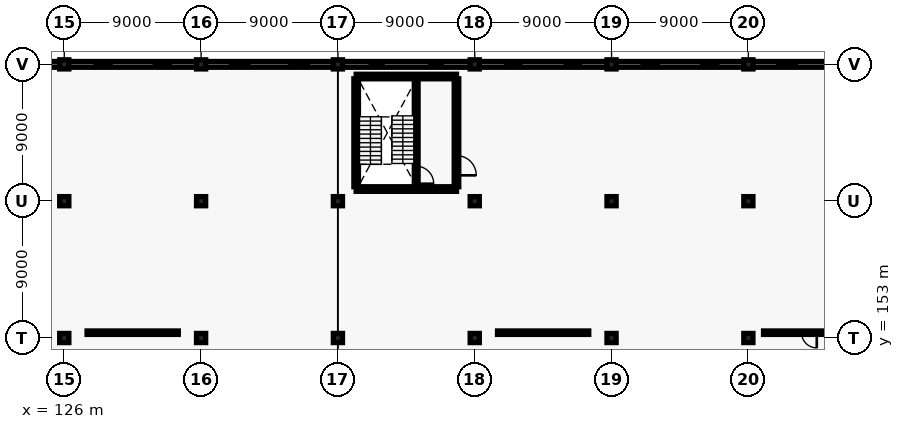
"""IFC4 building model, lengths in metres.
Left out: names, types, materials, properties, quantities, classifications, styles, units other than length and angle.
Written with IfcOpenShell. Run it as: python <this file> out.ifc"""

import sys

from ifc_helpers import new_model, si_unit, direction, frame, frame_2d, origin, origin_2d, place, context, subcontext, project, spatial, rectangle, extrude, element, fill, save


model = new_model("IFC4")
c1 = context("Model", 3, precision=1e-05, world=origin(), true_north=direction((0.0, 1.0)))
c2 = subcontext(c1, "Body", "Model", "MODEL_VIEW")
j1 = project(units=[si_unit("LENGTHUNIT", "METRE"), si_unit("PLANEANGLEUNIT", "RADIAN")], contexts=[c1])
p1 = place(None, origin())
s1 = spatial("IfcSite", under=j1, at=p1, CompositionType="ELEMENT")
p2 = place(p1, origin())
s2 = spatial("IfcBuilding", under=s1, at=p2, CompositionType="ELEMENT")
p3 = place(p2, frame((0.0, 0.0, 5.4)))
s3 = spatial("IfcBuildingStorey", under=s2, at=p3, CompositionType="ELEMENT", Elevation=5.4)
for number, where, z_axis, x_axis in (
    (1, (126.0, 153.0, 0.0), (0.0, 0.0, 1.0), (1.0, 0.0, 0.0)),
    (2, (126.0, 162.0, 0.0), (0.0, 0.0, 1.0), (1.0, 0.0, 0.0)),
    (3, (126.0, 171.0, 0.0), (0.0, 0.0, 1.0), (1.0, 0.0, 0.0)),
    (4, (135.0, 153.0, 0.0), (0.0, 0.0, 1.0), (1.0, 0.0, 0.0)),
    (5, (135.0, 162.0, 0.0), (0.0, 0.0, 1.0), (1.0, 0.0, 0.0)),
    (6, (135.0, 171.0, 0.0), (0.0, 0.0, 1.0), (1.0, 0.0, 0.0)),
    (7, (144.0, 153.0, 0.0), (0.0, 0.0, 1.0), (1.0, 0.0, 0.0)),
    (8, (144.0, 162.0, 0.0), (0.0, 0.0, 1.0), (1.0, 0.0, 0.0)),
    (9, (144.0, 171.0, 0.0), (0.0, 0.0, 1.0), (1.0, 0.0, 0.0)),
    (10, (153.0, 153.0, 0.0), (0.0, 0.0, 1.0), (1.0, 0.0, 0.0)),
    (11, (153.0, 162.0, 0.0), (0.0, 0.0, 1.0), (1.0, 0.0, 0.0)),
    (12, (153.0, 171.0, 0.0), (0.0, 0.0, 1.0), (1.0, 0.0, 0.0)),
    (13, (162.0, 153.0, 0.0), (0.0, 0.0, 1.0), (1.0, 0.0, 0.0)),
    (14, (162.0, 162.0, 0.0), (0.0, 0.0, 1.0), (1.0, 0.0, 0.0)),
    (15, (162.0, 171.0, 0.0), (0.0, 0.0, 1.0), (1.0, 0.0, 0.0)),
    (16, (171.0, 153.0, 0.0), (0.0, 0.0, 1.0), (1.0, 0.0, 0.0)),
    (17, (171.0, 162.0, 0.0), (0.0, 0.0, 1.0), (1.0, 0.0, 0.0)),
    (18, (171.0, 171.0, 0.0), (0.0, 0.0, 1.0), (1.0, 0.0, 0.0)),
):
    element("IfcColumn", number, at=place(p3, frame(where, z_axis=z_axis, x_axis=x_axis)), inside=s3, PredefinedType="COLUMN", context=c2, shape_type="SweptSolid", body=[
        extrude(rectangle(XDim=0.6, YDim=0.6, at=origin_2d()), origin(), (0.0, 0.0, 1.0), 4.2),
    ])
p4 = place(p3, frame((117.06, 171.0, 0.0), z_axis=(0.0, 0.0, 1.0), x_axis=(1.0, 0.0, 0.0)))
e19 = element("IfcWall", 19, at=p4, inside=s3, PredefinedType="SOLIDWALL", context=c2, shape_type="SweptSolid", body=[
    extrude(rectangle(XDim=8.88, YDim=0.38, at=frame_2d((4.44, 0.0))), origin(), (0.0, 0.0, 1.0), 3.4),
])
p5 = place(p4, frame((1.961, 0.0, 0.9)))
e20 = element("IfcOpeningElement", 20, at=p5, cuts=e19, PredefinedType="OPENING", context=c2, shape_type="SweptSolid", body=[
    extrude(rectangle(XDim=1.05, YDim=1.35, at=frame_2d((0.525, 0.675))), frame((0.0, 0.2, 0.0), z_axis=(0.0, -1.0, 0.0), x_axis=(1.0, 0.0, 0.0)), (0.0, 0.0, 1.0), 0.4),
])
p6 = place(p4, frame((5.869, 0.0, 0.9)))
e21 = element("IfcOpeningElement", 21, at=p6, cuts=e19, PredefinedType="OPENING", context=c2, shape_type="SweptSolid", body=[
    extrude(rectangle(XDim=1.05, YDim=1.35, at=frame_2d((0.525, 0.675))), frame((0.0, 0.2, 0.0), z_axis=(0.0, -1.0, 0.0), x_axis=(1.0, 0.0, 0.0)), (0.0, 0.0, 1.0), 0.4),
])
p7 = place(p3, frame((126.06, 171.0, 0.0), z_axis=(0.0, 0.0, 1.0), x_axis=(1.0, 0.0, 0.0)))
e22 = element("IfcWall", 22, at=p7, inside=s3, PredefinedType="SOLIDWALL", context=c2, shape_type="SweptSolid", body=[
    extrude(rectangle(XDim=8.88, YDim=0.38, at=frame_2d((4.44, 0.0))), origin(), (0.0, 0.0, 1.0), 3.4),
])
p8 = place(p7, frame((1.926, 0.0, 0.9)))
e23 = element("IfcOpeningElement", 23, at=p8, cuts=e22, PredefinedType="OPENING", context=c2, shape_type="SweptSolid", body=[
    extrude(rectangle(XDim=1.12, YDim=1.55, at=frame_2d((0.56, 0.775))), frame((0.0, 0.2, 0.0), z_axis=(0.0, -1.0, 0.0), x_axis=(1.0, 0.0, 0.0)), (0.0, 0.0, 1.0), 0.4),
])
p9 = place(p7, frame((5.834, 0.0, 0.9)))
e24 = element("IfcOpeningElement", 24, at=p9, cuts=e22, PredefinedType="OPENING", context=c2, shape_type="SweptSolid", body=[
    extrude(rectangle(XDim=1.12, YDim=1.55, at=frame_2d((0.56, 0.775))), frame((0.0, 0.2, 0.0), z_axis=(0.0, -1.0, 0.0), x_axis=(1.0, 0.0, 0.0)), (0.0, 0.0, 1.0), 0.4),
])
p10 = place(p3, frame((135.06, 171.0, 0.0), z_axis=(0.0, 0.0, 1.0), x_axis=(1.0, 0.0, 0.0)))
e25 = element("IfcWall", 25, at=p10, inside=s3, PredefinedType="SOLIDWALL", context=c2, shape_type="SweptSolid", body=[
    extrude(rectangle(XDim=8.88, YDim=0.38, at=frame_2d((4.44, 0.0))), origin(), (0.0, 0.0, 1.0), 3.4),
])
p11 = place(p10, frame((1.846, 0.0, 0.9)))
e26 = element("IfcOpeningElement", 26, at=p11, cuts=e25, PredefinedType="OPENING", context=c2, shape_type="SweptSolid", body=[
    extrude(rectangle(XDim=1.28, YDim=1.65, at=frame_2d((0.64, 0.825))), frame((0.0, 0.2, 0.0), z_axis=(0.0, -1.0, 0.0), x_axis=(1.0, 0.0, 0.0)), (0.0, 0.0, 1.0), 0.4),
])
p12 = place(p10, frame((5.754, 0.0, 0.9)))
e27 = element("IfcOpeningElement", 27, at=p12, cuts=e25, PredefinedType="OPENING", context=c2, shape_type="SweptSolid", body=[
    extrude(rectangle(XDim=1.28, YDim=1.65, at=frame_2d((0.64, 0.825))), frame((0.0, 0.2, 0.0), z_axis=(0.0, -1.0, 0.0), x_axis=(1.0, 0.0, 0.0)), (0.0, 0.0, 1.0), 0.4),
])
p13 = place(p3, frame((144.06, 171.0, 0.0), z_axis=(0.0, 0.0, 1.0), x_axis=(1.0, 0.0, 0.0)))
e28 = element("IfcWall", 28, at=p13, inside=s3, PredefinedType="SOLIDWALL", context=c2, shape_type="SweptSolid", body=[
    extrude(rectangle(XDim=8.88, YDim=0.38, at=frame_2d((4.44, 0.0))), origin(), (0.0, 0.0, 1.0), 3.4),
])
p14 = place(p13, frame((2.036, 0.0, 0.9)))
e29 = element("IfcOpeningElement", 29, at=p14, cuts=e28, PredefinedType="OPENING", context=c2, shape_type="SweptSolid", body=[
    extrude(rectangle(XDim=0.9, YDim=1.2, at=frame_2d((0.45, 0.6))), frame((0.0, 0.2, 0.0), z_axis=(0.0, -1.0, 0.0), x_axis=(1.0, 0.0, 0.0)), (0.0, 0.0, 1.0), 0.4),
])
p15 = place(p13, frame((5.944, 0.0, 0.9)))
e30 = element("IfcOpeningElement", 30, at=p15, cuts=e28, PredefinedType="OPENING", context=c2, shape_type="SweptSolid", body=[
    extrude(rectangle(XDim=0.9, YDim=1.2, at=frame_2d((0.45, 0.6))), frame((0.0, 0.2, 0.0), z_axis=(0.0, -1.0, 0.0), x_axis=(1.0, 0.0, 0.0)), (0.0, 0.0, 1.0), 0.4),
])
p16 = place(p3, frame((153.06, 171.0, 0.0), z_axis=(0.0, 0.0, 1.0), x_axis=(1.0, 0.0, 0.0)))
e31 = element("IfcWall", 31, at=p16, inside=s3, PredefinedType="SOLIDWALL", context=c2, shape_type="SweptSolid", body=[
    extrude(rectangle(XDim=8.88, YDim=0.38, at=frame_2d((4.44, 0.0))), origin(), (0.0, 0.0, 1.0), 3.4),
])
p17 = place(p16, frame((1.961, 0.0, 0.9)))
e32 = element("IfcOpeningElement", 32, at=p17, cuts=e31, PredefinedType="OPENING", context=c2, shape_type="SweptSolid", body=[
    extrude(rectangle(XDim=1.05, YDim=1.35, at=frame_2d((0.525, 0.675))), frame((0.0, 0.2, 0.0), z_axis=(0.0, -1.0, 0.0), x_axis=(1.0, 0.0, 0.0)), (0.0, 0.0, 1.0), 0.4),
])
p18 = place(p16, frame((5.869, 0.0, 0.9)))
e33 = element("IfcOpeningElement", 33, at=p18, cuts=e31, PredefinedType="OPENING", context=c2, shape_type="SweptSolid", body=[
    extrude(rectangle(XDim=1.05, YDim=1.35, at=frame_2d((0.525, 0.675))), frame((0.0, 0.2, 0.0), z_axis=(0.0, -1.0, 0.0), x_axis=(1.0, 0.0, 0.0)), (0.0, 0.0, 1.0), 0.4),
])
p19 = place(p3, frame((162.06, 171.0, 0.0), z_axis=(0.0, 0.0, 1.0), x_axis=(1.0, 0.0, 0.0)))
e34 = element("IfcWall", 34, at=p19, inside=s3, PredefinedType="SOLIDWALL", context=c2, shape_type="SweptSolid", body=[
    extrude(rectangle(XDim=8.88, YDim=0.38, at=frame_2d((4.44, 0.0))), origin(), (0.0, 0.0, 1.0), 3.4),
])
p20 = place(p19, frame((1.926, 0.0, 0.9)))
e35 = element("IfcOpeningElement", 35, at=p20, cuts=e34, PredefinedType="OPENING", context=c2, shape_type="SweptSolid", body=[
    extrude(rectangle(XDim=1.12, YDim=1.55, at=frame_2d((0.56, 0.775))), frame((0.0, 0.2, 0.0), z_axis=(0.0, -1.0, 0.0), x_axis=(1.0, 0.0, 0.0)), (0.0, 0.0, 1.0), 0.4),
])
p21 = place(p19, frame((5.834, 0.0, 0.9)))
e36 = element("IfcOpeningElement", 36, at=p21, cuts=e34, PredefinedType="OPENING", context=c2, shape_type="SweptSolid", body=[
    extrude(rectangle(XDim=1.12, YDim=1.55, at=frame_2d((0.56, 0.775))), frame((0.0, 0.2, 0.0), z_axis=(0.0, -1.0, 0.0), x_axis=(1.0, 0.0, 0.0)), (0.0, 0.0, 1.0), 0.4),
])
p22 = place(p3, frame((171.06, 171.0, 0.0), z_axis=(0.0, 0.0, 1.0), x_axis=(1.0, 0.0, 0.0)))
e37 = element("IfcWall", 37, at=p22, inside=s3, PredefinedType="SOLIDWALL", context=c2, shape_type="SweptSolid", body=[
    extrude(rectangle(XDim=8.88, YDim=0.38, at=frame_2d((4.44, 0.0))), origin(), (0.0, 0.0, 1.0), 3.4),
])
p23 = place(p22, frame((1.846, 0.0, 0.9)))
e38 = element("IfcOpeningElement", 38, at=p23, cuts=e37, PredefinedType="OPENING", context=c2, shape_type="SweptSolid", body=[
    extrude(rectangle(XDim=1.28, YDim=1.65, at=frame_2d((0.64, 0.825))), frame((0.0, 0.2, 0.0), z_axis=(0.0, -1.0, 0.0), x_axis=(1.0, 0.0, 0.0)), (0.0, 0.0, 1.0), 0.4),
])
p24 = place(p22, frame((5.754, 0.0, 0.9)))
e39 = element("IfcOpeningElement", 39, at=p24, cuts=e37, PredefinedType="OPENING", context=c2, shape_type="SweptSolid", body=[
    extrude(rectangle(XDim=1.28, YDim=1.65, at=frame_2d((0.64, 0.825))), frame((0.0, 0.2, 0.0), z_axis=(0.0, -1.0, 0.0), x_axis=(1.0, 0.0, 0.0)), (0.0, 0.0, 1.0), 0.4),
])
for number, where, z_axis, x_axis in (
    (40, (145.2, 162.8, 0.0), (0.0, 0.0, 1.0), (1.0, 0.0, 0.0)),
    (41, (145.2, 170.2, 0.0), (0.0, 0.0, 1.0), (1.0, 0.0, 0.0)),
):
    element("IfcWall", number, at=place(p3, frame(where, z_axis=z_axis, x_axis=x_axis)), inside=s3, PredefinedType="SHEAR", context=c2, shape_type="SweptSolid", body=[
        extrude(rectangle(XDim=6.6, YDim=0.3, at=frame_2d((3.3, 0.0))), origin(), (0.0, 0.0, 1.0), 4.2),
    ])
p25 = place(p3, frame((145.2, 162.95, 0.0), z_axis=(0.0, 0.0, 1.0), x_axis=(0.0, 1.0, 0.0)))
e42 = element("IfcWall", 42, at=p25, inside=s3, PredefinedType="SHEAR", context=c2, shape_type="SweptSolid", body=[
    extrude(rectangle(XDim=7.1, YDim=0.3, at=frame_2d((3.55, 0.0))), origin(), (0.0, 0.0, 1.0), 4.2),
])
p26 = place(p3, frame((151.8, 162.95, 0.0), z_axis=(0.0, 0.0, 1.0), x_axis=(0.0, 1.0, 0.0)))
e43 = element("IfcWall", 43, at=p26, inside=s3, PredefinedType="SHEAR", context=c2, shape_type="SweptSolid", body=[
    extrude(rectangle(XDim=7.1, YDim=0.3, at=frame_2d((3.55, 0.0))), origin(), (0.0, 0.0, 1.0), 4.2),
])
p27 = place(p26, frame((0.75, 0.0, 0.0)))
e44 = element("IfcOpeningElement", 44, at=p27, cuts=e43, PredefinedType="OPENING", context=c2, shape_type="SweptSolid", body=[
    extrude(rectangle(XDim=1.3, YDim=2.15, at=frame_2d((0.65, 1.075))), frame((0.0, 0.16, 0.0), z_axis=(0.0, -1.0, 0.0), x_axis=(1.0, 0.0, 0.0)), (0.0, 0.0, 1.0), 0.32),
])
p28 = place(p3, frame((149.15, 162.95, 0.0), z_axis=(0.0, 0.0, 1.0), x_axis=(0.0, 1.0, 0.0)))
e45 = element("IfcWall", 45, at=p28, inside=s3, PredefinedType="SHEAR", context=c2, shape_type="SweptSolid", body=[
    extrude(rectangle(XDim=7.1, YDim=0.25, at=frame_2d((3.55, 0.0))), origin(), (0.0, 0.0, 1.0), 4.2),
])
p29 = place(p28, frame((0.2, 0.0, 0.0)))
e46 = element("IfcOpeningElement", 46, at=p29, cuts=e45, PredefinedType="OPENING", context=c2, shape_type="SweptSolid", body=[
    extrude(rectangle(XDim=1.15, YDim=2.15, at=frame_2d((0.575, 1.075))), frame((0.0, 0.135, 0.0), z_axis=(0.0, -1.0, 0.0), x_axis=(1.0, 0.0, 0.0)), (0.0, 0.0, 1.0), 0.27),
])
p30 = place(p3, frame((127.5, 153.35, 0.0), z_axis=(0.0, 0.0, 1.0), x_axis=(1.0, 0.0, 0.0)))
e47 = element("IfcWall", 47, at=p30, inside=s3, PredefinedType="PARTITIONING", context=c2, shape_type="SweptSolid", body=[
    extrude(rectangle(XDim=6.0, YDim=0.225, at=frame_2d((3.0, 0.0))), origin(), (0.0, 0.0, 1.0), 3.2),
])
p31 = place(p30, frame((2.1, 0.0, 0.0)))
e48 = element("IfcOpeningElement", 48, at=p31, cuts=e47, PredefinedType="OPENING", context=c2, shape_type="SweptSolid", body=[
    extrude(rectangle(XDim=1.8, YDim=2.4, at=frame_2d((0.9, 1.2))), frame((0.0, 0.123, 0.0), z_axis=(0.0, -1.0, 0.0), x_axis=(1.0, 0.0, 0.0)), (0.0, 0.0, 1.0), 0.245),
])
p32 = place(p3, frame((154.5, 153.35, 0.0), z_axis=(0.0, 0.0, 1.0), x_axis=(1.0, 0.0, 0.0)))
e49 = element("IfcWall", 49, at=p32, inside=s3, PredefinedType="PARTITIONING", context=c2, shape_type="SweptSolid", body=[
    extrude(rectangle(XDim=6.0, YDim=0.225, at=frame_2d((3.0, 0.0))), origin(), (0.0, 0.0, 1.0), 3.2),
])
p33 = place(p32, frame((2.025, 0.0, 0.0)))
e50 = element("IfcOpeningElement", 50, at=p33, cuts=e49, PredefinedType="OPENING", context=c2, shape_type="SweptSolid", body=[
    extrude(rectangle(XDim=1.95, YDim=2.5, at=frame_2d((0.975, 1.25))), frame((0.0, 0.123, 0.0), z_axis=(0.0, -1.0, 0.0), x_axis=(1.0, 0.0, 0.0)), (0.0, 0.0, 1.0), 0.245),
])
p34 = place(p3, frame((172.0, 153.35, 0.0), z_axis=(0.0, 0.0, 1.0), x_axis=(1.0, 0.0, 0.0)))
e51 = element("IfcWall", 51, at=p34, inside=s3, PredefinedType="PARTITIONING", context=c2, shape_type="SweptSolid", body=[
    extrude(rectangle(XDim=6.0, YDim=0.225, at=frame_2d((3.0, 0.0))), origin(), (0.0, 0.0, 1.0), 3.2),
])
p35 = place(p34, frame((2.5, 0.0, 0.0)))
e52 = element("IfcOpeningElement", 52, at=p35, cuts=e51, PredefinedType="OPENING", context=c2, shape_type="SweptSolid", body=[
    extrude(rectangle(XDim=1.0, YDim=2.1, at=frame_2d((0.5, 1.05))), frame((0.0, 0.123, 0.0), z_axis=(0.0, -1.0, 0.0), x_axis=(1.0, 0.0, 0.0)), (0.0, 0.0, 1.0), 0.245),
])
p36 = place(p8, origin())
e53 = element("IfcWindow", 53, at=p36, inside=s3, PartitioningType="SINGLE_PANEL", PredefinedType="WINDOW", context=c2, shape_type="SweptSolid", body=[
    extrude(rectangle(XDim=1.12, YDim=1.55, at=frame_2d((0.56, 0.775))), frame((0.0, 0.03, 0.0), z_axis=(0.0, -1.0, 0.0), x_axis=(1.0, 0.0, 0.0)), (0.0, 0.0, 1.0), 0.06),
])
fill(e23, e53)
p37 = place(p9, origin())
e54 = element("IfcWindow", 54, at=p37, inside=s3, PartitioningType="SINGLE_PANEL", PredefinedType="WINDOW", context=c2, shape_type="SweptSolid", body=[
    extrude(rectangle(XDim=1.12, YDim=1.55, at=frame_2d((0.56, 0.775))), frame((0.0, 0.03, 0.0), z_axis=(0.0, -1.0, 0.0), x_axis=(1.0, 0.0, 0.0)), (0.0, 0.0, 1.0), 0.06),
])
fill(e24, e54)
p38 = place(p11, origin())
e55 = element("IfcWindow", 55, at=p38, inside=s3, PartitioningType="SINGLE_PANEL", PredefinedType="WINDOW", context=c2, shape_type="SweptSolid", body=[
    extrude(rectangle(XDim=1.28, YDim=1.65, at=frame_2d((0.64, 0.825))), frame((0.0, 0.03, 0.0), z_axis=(0.0, -1.0, 0.0), x_axis=(1.0, 0.0, 0.0)), (0.0, 0.0, 1.0), 0.06),
])
fill(e26, e55)
p39 = place(p12, origin())
e56 = element("IfcWindow", 56, at=p39, inside=s3, PartitioningType="SINGLE_PANEL", PredefinedType="WINDOW", context=c2, shape_type="SweptSolid", body=[
    extrude(rectangle(XDim=1.28, YDim=1.65, at=frame_2d((0.64, 0.825))), frame((0.0, 0.03, 0.0), z_axis=(0.0, -1.0, 0.0), x_axis=(1.0, 0.0, 0.0)), (0.0, 0.0, 1.0), 0.06),
])
fill(e27, e56)
p40 = place(p14, origin())
e57 = element("IfcWindow", 57, at=p40, inside=s3, PartitioningType="SINGLE_PANEL", PredefinedType="WINDOW", context=c2, shape_type="SweptSolid", body=[
    extrude(rectangle(XDim=0.9, YDim=1.2, at=frame_2d((0.45, 0.6))), frame((0.0, 0.03, 0.0), z_axis=(0.0, -1.0, 0.0), x_axis=(1.0, 0.0, 0.0)), (0.0, 0.0, 1.0), 0.06),
])
fill(e29, e57)
p41 = place(p15, origin())
e58 = element("IfcWindow", 58, at=p41, inside=s3, PartitioningType="SINGLE_PANEL", PredefinedType="WINDOW", context=c2, shape_type="SweptSolid", body=[
    extrude(rectangle(XDim=0.9, YDim=1.2, at=frame_2d((0.45, 0.6))), frame((0.0, 0.03, 0.0), z_axis=(0.0, -1.0, 0.0), x_axis=(1.0, 0.0, 0.0)), (0.0, 0.0, 1.0), 0.06),
])
fill(e30, e58)
p42 = place(p17, origin())
e59 = element("IfcWindow", 59, at=p42, inside=s3, PartitioningType="SINGLE_PANEL", PredefinedType="WINDOW", context=c2, shape_type="SweptSolid", body=[
    extrude(rectangle(XDim=1.05, YDim=1.35, at=frame_2d((0.525, 0.675))), frame((0.0, 0.03, 0.0), z_axis=(0.0, -1.0, 0.0), x_axis=(1.0, 0.0, 0.0)), (0.0, 0.0, 1.0), 0.06),
])
fill(e32, e59)
p43 = place(p18, origin())
e60 = element("IfcWindow", 60, at=p43, inside=s3, PartitioningType="SINGLE_PANEL", PredefinedType="WINDOW", context=c2, shape_type="SweptSolid", body=[
    extrude(rectangle(XDim=1.05, YDim=1.35, at=frame_2d((0.525, 0.675))), frame((0.0, 0.03, 0.0), z_axis=(0.0, -1.0, 0.0), x_axis=(1.0, 0.0, 0.0)), (0.0, 0.0, 1.0), 0.06),
])
fill(e33, e60)
p44 = place(p20, origin())
e61 = element("IfcWindow", 61, at=p44, inside=s3, PartitioningType="SINGLE_PANEL", PredefinedType="WINDOW", context=c2, shape_type="SweptSolid", body=[
    extrude(rectangle(XDim=1.12, YDim=1.55, at=frame_2d((0.56, 0.775))), frame((0.0, 0.03, 0.0), z_axis=(0.0, -1.0, 0.0), x_axis=(1.0, 0.0, 0.0)), (0.0, 0.0, 1.0), 0.06),
])
fill(e35, e61)
p45 = place(p21, origin())
e62 = element("IfcWindow", 62, at=p45, inside=s3, PartitioningType="SINGLE_PANEL", PredefinedType="WINDOW", context=c2, shape_type="SweptSolid", body=[
    extrude(rectangle(XDim=1.12, YDim=1.55, at=frame_2d((0.56, 0.775))), frame((0.0, 0.03, 0.0), z_axis=(0.0, -1.0, 0.0), x_axis=(1.0, 0.0, 0.0)), (0.0, 0.0, 1.0), 0.06),
])
fill(e36, e62)
p46 = place(p23, origin())
e63 = element("IfcWindow", 63, at=p46, inside=s3, PartitioningType="SINGLE_PANEL", PredefinedType="WINDOW", context=c2, shape_type="SweptSolid", body=[
    extrude(rectangle(XDim=1.28, YDim=1.65, at=frame_2d((0.64, 0.825))), frame((0.0, 0.03, 0.0), z_axis=(0.0, -1.0, 0.0), x_axis=(1.0, 0.0, 0.0)), (0.0, 0.0, 1.0), 0.06),
])
fill(e38, e63)
p47 = place(p27, frame((1.3, 0.0, 0.0), z_axis=(0.0, 0.0, 1.0), x_axis=(-1.0, 0.0, 0.0)))
e64 = element("IfcDoor", 64, at=p47, inside=s3, OperationType="DOUBLE_DOOR_SINGLE_SWING", PredefinedType="DOOR", context=c2, shape_type="SweptSolid", body=[
    extrude(rectangle(XDim=1.3, YDim=2.15, at=frame_2d((0.65, 1.075))), frame((0.0, 0.025, 0.0), z_axis=(0.0, -1.0, 0.0), x_axis=(1.0, 0.0, 0.0)), (0.0, 0.0, 1.0), 0.05),
])
fill(e44, e64)
p48 = place(p29, frame((1.15, 0.0, 0.0), z_axis=(0.0, 0.0, 1.0), x_axis=(-1.0, 0.0, 0.0)))
e65 = element("IfcDoor", 65, at=p48, inside=s3, OperationType="SINGLE_SWING_LEFT", PredefinedType="DOOR", context=c2, shape_type="SweptSolid", body=[
    extrude(rectangle(XDim=1.15, YDim=2.15, at=frame_2d((0.575, 1.075))), frame((0.0, 0.025, 0.0), z_axis=(0.0, -1.0, 0.0), x_axis=(1.0, 0.0, 0.0)), (0.0, 0.0, 1.0), 0.05),
])
fill(e46, e65)
p49 = place(p31, origin())
e66 = element("IfcDoor", 66, at=p49, inside=s3, OperationType="SLIDING_TO_RIGHT", PredefinedType="DOOR", context=c2, shape_type="SweptSolid", body=[
    extrude(rectangle(XDim=1.8, YDim=2.4, at=frame_2d((0.9, 1.2))), frame((0.0, 0.025, 0.0), z_axis=(0.0, -1.0, 0.0), x_axis=(1.0, 0.0, 0.0)), (0.0, 0.0, 1.0), 0.05),
])
fill(e48, e66)
p50 = place(p33, origin())
e67 = element("IfcDoor", 67, at=p50, inside=s3, OperationType="SLIDING_TO_LEFT", PredefinedType="DOOR", context=c2, shape_type="SweptSolid", body=[
    extrude(rectangle(XDim=1.95, YDim=2.5, at=frame_2d((0.975, 1.25))), frame((0.0, 0.025, 0.0), z_axis=(0.0, -1.0, 0.0), x_axis=(1.0, 0.0, 0.0)), (0.0, 0.0, 1.0), 0.05),
])
fill(e50, e67)
p51 = place(p35, origin())
e68 = element("IfcDoor", 68, at=p51, inside=s3, OperationType="SINGLE_SWING_RIGHT", PredefinedType="DOOR", context=c2, shape_type="SweptSolid", body=[
    extrude(rectangle(XDim=1.0, YDim=2.1, at=frame_2d((0.5, 1.05))), frame((0.0, 0.025, 0.0), z_axis=(0.0, -1.0, 0.0), x_axis=(1.0, 0.0, 0.0)), (0.0, 0.0, 1.0), 0.05),
])
fill(e52, e68)
save(model, sys.argv[1])
